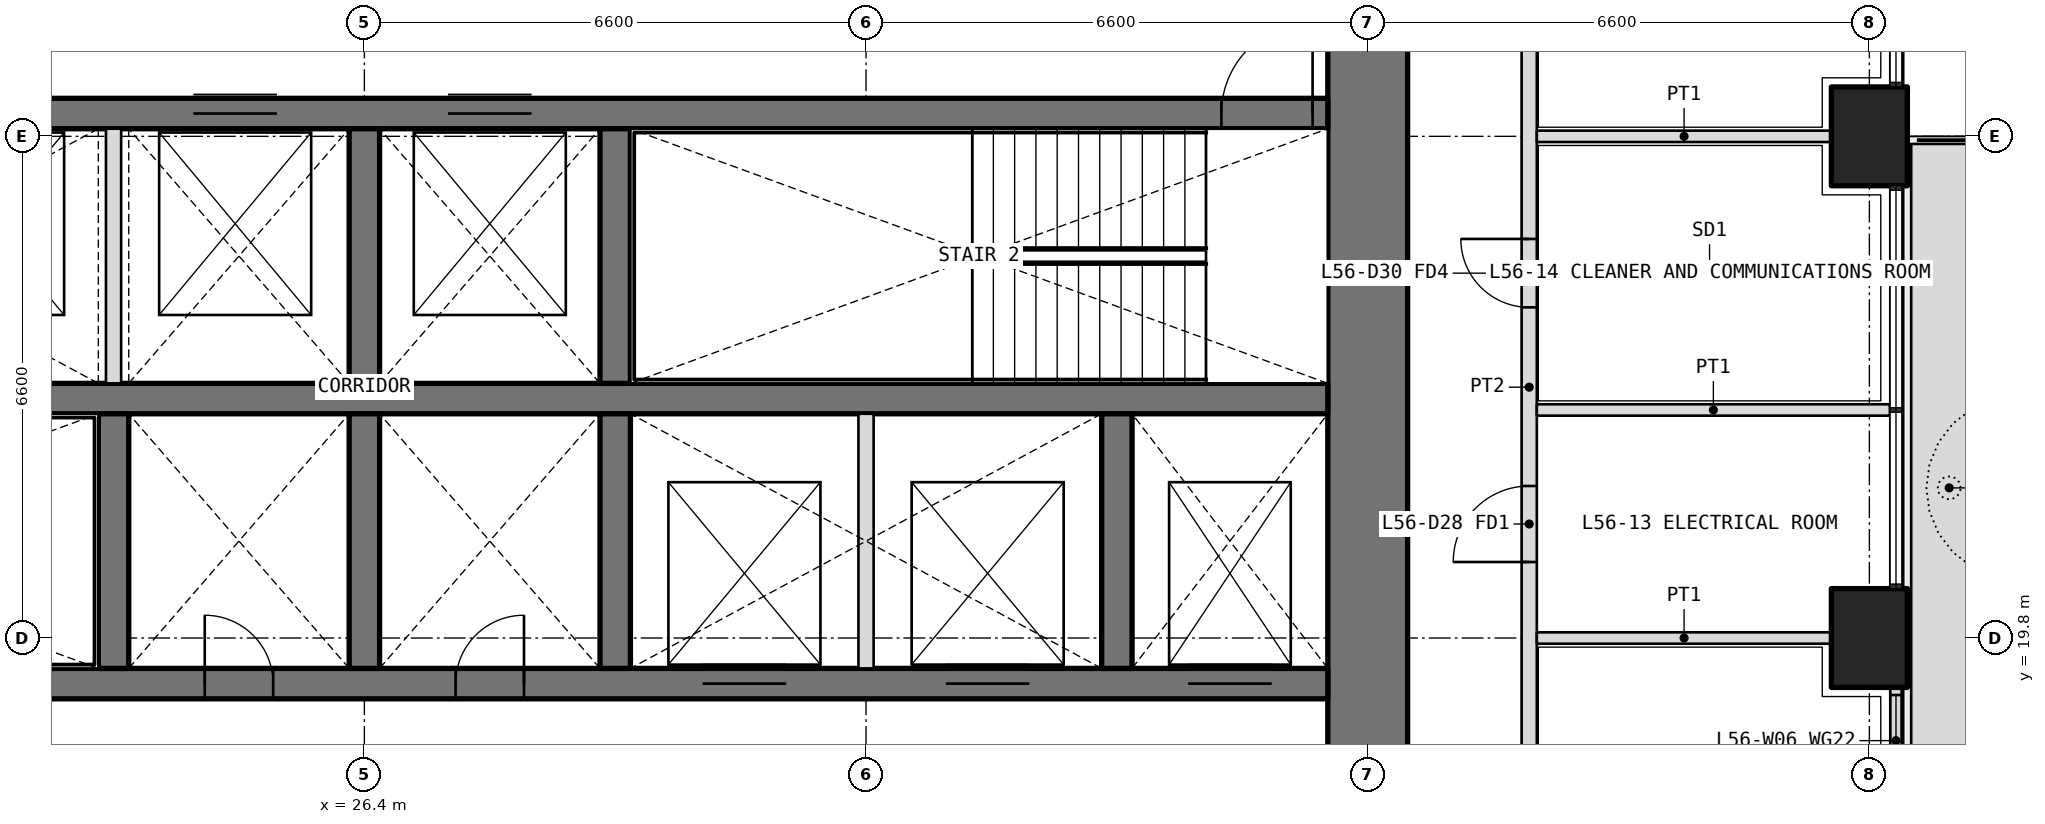
"""IFC4 building model, lengths in metres.
Left out: names, types, materials, properties, quantities, classifications, styles, units other than length and angle.
Written with IfcOpenShell. Run it as: python <this file> out.ifc"""

import sys

from ifc_helpers import new_model, si_unit, direction, frame, frame_2d, origin, origin_2d, place, context, subcontext, project, spatial, polyline, rectangle, outline, extrude, element, fill, save


model = new_model("IFC4")
c1 = context("Model", 3, precision=1e-05, world=origin(), true_north=direction((0.0, 1.0)))
c2 = subcontext(c1, "Body", "Model", "MODEL_VIEW")
j1 = project(units=[si_unit("LENGTHUNIT", "METRE"), si_unit("PLANEANGLEUNIT", "RADIAN")], contexts=[c1])
p1 = place(None, origin())
s1 = spatial("IfcSite", under=j1, at=p1, CompositionType="ELEMENT")
p2 = place(p1, origin())
s2 = spatial("IfcBuilding", under=s1, at=p2, CompositionType="ELEMENT")
p3 = place(p2, frame((0.0, 0.0, 246.0)))
s3 = spatial("IfcBuildingStorey", under=s2, at=p3, CompositionType="ELEMENT", Elevation=246.0)
for number, where, z_axis, x_axis in (
    (1, (46.2, 19.8, 0.0), (0.0, 0.0, 1.0), (0.0, 1.0, 0.0)),
    (2, (46.2, 26.4, 0.0), (0.0, 0.0, 1.0), (0.0, 1.0, 0.0)),
):
    element("IfcColumn", number, at=place(p3, frame(where, z_axis=z_axis, x_axis=x_axis)), inside=s3, PredefinedType="COLUMN", context=c2, shape_type="SweptSolid", body=[
        extrude(rectangle(XDim=1.3, YDim=1.0, at=origin_2d()), origin(), (0.0, 0.0, 1.0), 4.2),
    ])
p4 = place(p3, origin())
e3 = element("IfcWall", 3, at=p4, inside=s3, PredefinedType="USERDEFINED", context=c2, shape_type="SweptSolid", body=[
    extrude(outline(polyline([(46.75, 17.25), (47.75, 17.25), (47.75, 26.3), (46.75, 26.3), (46.75, 17.25)]), holes=[polyline([(46.9, 17.4), (47.6, 17.4), (47.6, 26.15), (46.9, 26.15), (46.9, 17.4)])]), origin(), (0.0, 0.0, 1.0), 1.05),
])
p5 = place(p3, frame((46.55, 13.85, 0.0), z_axis=(0.0, 0.0, 1.0), x_axis=(0.0, 1.0, 0.0)))
e4 = element("IfcWall", 4, at=p5, inside=s3, PredefinedType="SOLIDWALL", context=c2, shape_type="SweptSolid", body=[
    extrude(rectangle(XDim=5.3, YDim=0.15, at=frame_2d((2.65, 0.0))), origin(), (0.0, 0.0, 1.0), 2.7),
])
p6 = place(p5, frame((2.9, 0.0, 0.0)))
e5 = element("IfcOpeningElement", 5, at=p6, cuts=e4, PredefinedType="OPENING", context=c2, shape_type="SweptSolid", body=[
    extrude(rectangle(XDim=1.0, YDim=2.4, at=frame_2d((0.5, 1.2))), frame((0.0, 0.085, 0.0), z_axis=(0.0, -1.0, 0.0), x_axis=(1.0, 0.0, 0.0)), (0.0, 0.0, 1.0), 0.17),
])
p7 = place(p5, frame((0.1, 0.0, 0.1)))
e6 = element("IfcOpeningElement", 6, at=p7, cuts=e4, PredefinedType="OPENING", context=c2, shape_type="SweptSolid", body=[
    extrude(rectangle(XDim=2.3, YDim=2.3, at=frame_2d((1.15, 1.15))), frame((0.0, 0.085, 0.0), z_axis=(0.0, -1.0, 0.0), x_axis=(1.0, 0.0, 0.0)), (0.0, 0.0, 1.0), 0.17),
])
p8 = place(p5, frame((4.0, 0.0, 0.1)))
e7 = element("IfcOpeningElement", 7, at=p8, cuts=e4, PredefinedType="OPENING", context=c2, shape_type="SweptSolid", body=[
    extrude(rectangle(XDim=1.2, YDim=2.3, at=frame_2d((0.6, 1.15))), frame((0.0, 0.085, 0.0), z_axis=(0.0, -1.0, 0.0), x_axis=(1.0, 0.0, 0.0)), (0.0, 0.0, 1.0), 0.17),
])
p9 = place(p3, frame((39.6, 13.725, 0.0), z_axis=(0.0, 0.0, 1.0), x_axis=(0.0, 1.0, 0.0)))
e8 = element("IfcWall", 8, at=p9, inside=s3, PredefinedType="SHEAR", context=c2, shape_type="SweptSolid", body=[
    extrude(rectangle(XDim=18.75, YDim=1.05, at=frame_2d((9.375, 0.0))), origin(), (0.0, 0.0, 1.0), 4.2),
])
p10 = place(p9, frame((3.025, 0.0, 0.0)))
e9 = element("IfcOpeningElement", 9, at=p10, cuts=e8, PredefinedType="OPENING", context=c2, shape_type="SweptSolid", body=[
    extrude(rectangle(XDim=1.6, YDim=2.1, at=frame_2d((0.8, 1.05))), frame((0.0, 0.535, 0.0), z_axis=(0.0, -1.0, 0.0), x_axis=(1.0, 0.0, 0.0)), (0.0, 0.0, 1.0), 1.07),
])
p11 = place(p9, frame((13.825, 0.0, 0.0)))
e10 = element("IfcOpeningElement", 10, at=p11, cuts=e8, PredefinedType="OPENING", context=c2, shape_type="SweptSolid", body=[
    extrude(rectangle(XDim=1.6, YDim=2.1, at=frame_2d((0.8, 1.05))), frame((0.0, 0.535, 0.0), z_axis=(0.0, -1.0, 0.0), x_axis=(1.0, 0.0, 0.0)), (0.0, 0.0, 1.0), 1.07),
])
p12 = place(p3, frame((13.725, 19.2, 0.0), z_axis=(0.0, 0.0, 1.0), x_axis=(1.0, 0.0, 0.0)))
e11 = element("IfcWall", 11, at=p12, inside=s3, PredefinedType="SHEAR", context=c2, shape_type="SweptSolid", body=[
    extrude(rectangle(XDim=25.35, YDim=0.4, at=frame_2d((12.675, 0.0))), origin(), (0.0, 0.0, 1.0), 4.2),
])
p13 = place(p12, frame((10.575, 0.0, 0.0)))
e12 = element("IfcOpeningElement", 12, at=p13, cuts=e11, PredefinedType="OPENING", context=c2, shape_type="SweptSolid", body=[
    extrude(rectangle(XDim=0.9, YDim=2.1, at=frame_2d((0.45, 1.05))), frame((0.0, 0.21, 0.0), z_axis=(0.0, -1.0, 0.0), x_axis=(1.0, 0.0, 0.0)), (0.0, 0.0, 1.0), 0.42),
])
p14 = place(p12, frame((13.875, 0.0, 0.0)))
e13 = element("IfcOpeningElement", 13, at=p14, cuts=e11, PredefinedType="OPENING", context=c2, shape_type="SweptSolid", body=[
    extrude(rectangle(XDim=0.9, YDim=2.1, at=frame_2d((0.45, 1.05))), frame((0.0, 0.21, 0.0), z_axis=(0.0, -1.0, 0.0), x_axis=(1.0, 0.0, 0.0)), (0.0, 0.0, 1.0), 0.42),
])
p15 = place(p12, frame((0.2, 0.0, 0.0)))
e14 = element("IfcOpeningElement", 14, at=p15, cuts=e11, PredefinedType="OPENING", context=c2, shape_type="SweptSolid", body=[
    extrude(rectangle(XDim=1.2, YDim=2.1, at=frame_2d((0.6, 1.05))), frame((0.0, 0.21, 0.0), z_axis=(0.0, -1.0, 0.0), x_axis=(1.0, 0.0, 0.0)), (0.0, 0.0, 1.0), 0.42),
])
p16 = place(p12, frame((23.512, 0.0, 0.0)))
e15 = element("IfcOpeningElement", 15, at=p16, cuts=e11, PredefinedType="OPENING", context=c2, shape_type="SweptSolid", body=[
    extrude(rectangle(XDim=1.1, YDim=2.1, at=frame_2d((0.55, 1.05))), frame((0.0, 0.21, 0.0), z_axis=(0.0, -1.0, 0.0), x_axis=(1.0, 0.0, 0.0)), (0.0, 0.0, 1.0), 0.42),
])
p17 = place(p12, frame((17.125, 0.0, 0.0)))
e16 = element("IfcOpeningElement", 16, at=p17, cuts=e11, PredefinedType="OPENING", context=c2, shape_type="SweptSolid", body=[
    extrude(rectangle(XDim=1.1, YDim=2.1, at=frame_2d((0.55, 1.05))), frame((0.0, 0.21, 0.0), z_axis=(0.0, -1.0, 0.0), x_axis=(1.0, 0.0, 0.0)), (0.0, 0.0, 1.0), 0.42),
])
p18 = place(p12, frame((20.325, 0.0, 0.0)))
e17 = element("IfcOpeningElement", 17, at=p18, cuts=e11, PredefinedType="OPENING", context=c2, shape_type="SweptSolid", body=[
    extrude(rectangle(XDim=1.1, YDim=2.1, at=frame_2d((0.55, 1.05))), frame((0.0, 0.21, 0.0), z_axis=(0.0, -1.0, 0.0), x_axis=(1.0, 0.0, 0.0)), (0.0, 0.0, 1.0), 0.42),
])
p19 = place(p3, frame((13.725, 22.95, 0.0), z_axis=(0.0, 0.0, 1.0), x_axis=(1.0, 0.0, 0.0)))
e18 = element("IfcWall", 18, at=p19, inside=s3, PredefinedType="SHEAR", context=c2, shape_type="SweptSolid", body=[
    extrude(rectangle(XDim=25.35, YDim=0.4, at=frame_2d((12.675, 0.0))), origin(), (0.0, 0.0, 1.0), 4.2),
])
p20 = place(p3, frame((13.725, 26.7, 0.0), z_axis=(0.0, 0.0, 1.0), x_axis=(1.0, 0.0, 0.0)))
e19 = element("IfcWall", 19, at=p20, inside=s3, PredefinedType="SHEAR", context=c2, shape_type="SweptSolid", body=[
    extrude(rectangle(XDim=25.35, YDim=0.4, at=frame_2d((12.675, 0.0))), origin(), (0.0, 0.0, 1.0), 4.2),
])
p21 = place(p20, frame((23.95, 0.0, 0.0)))
e20 = element("IfcOpeningElement", 20, at=p21, cuts=e19, PredefinedType="OPENING", context=c2, shape_type="SweptSolid", body=[
    extrude(rectangle(XDim=1.2, YDim=2.1, at=frame_2d((0.6, 1.05))), frame((0.0, 0.21, 0.0), z_axis=(0.0, -1.0, 0.0), x_axis=(1.0, 0.0, 0.0)), (0.0, 0.0, 1.0), 0.42),
])
p22 = place(p20, frame((0.738, 0.0, 0.0)))
e21 = element("IfcOpeningElement", 21, at=p22, cuts=e19, PredefinedType="OPENING", context=c2, shape_type="SweptSolid", body=[
    extrude(rectangle(XDim=1.1, YDim=2.1, at=frame_2d((0.55, 1.05))), frame((0.0, 0.21, 0.0), z_axis=(0.0, -1.0, 0.0), x_axis=(1.0, 0.0, 0.0)), (0.0, 0.0, 1.0), 0.42),
])
p23 = place(p20, frame((3.925, 0.0, 0.0)))
e22 = element("IfcOpeningElement", 22, at=p23, cuts=e19, PredefinedType="OPENING", context=c2, shape_type="SweptSolid", body=[
    extrude(rectangle(XDim=1.1, YDim=2.1, at=frame_2d((0.55, 1.05))), frame((0.0, 0.21, 0.0), z_axis=(0.0, -1.0, 0.0), x_axis=(1.0, 0.0, 0.0)), (0.0, 0.0, 1.0), 0.42),
])
p24 = place(p20, frame((7.175, 0.0, 0.0)))
e23 = element("IfcOpeningElement", 23, at=p24, cuts=e19, PredefinedType="OPENING", context=c2, shape_type="SweptSolid", body=[
    extrude(rectangle(XDim=1.1, YDim=2.1, at=frame_2d((0.55, 1.05))), frame((0.0, 0.21, 0.0), z_axis=(0.0, -1.0, 0.0), x_axis=(1.0, 0.0, 0.0)), (0.0, 0.0, 1.0), 0.42),
])
p25 = place(p20, frame((10.425, 0.0, 0.0)))
e24 = element("IfcOpeningElement", 24, at=p25, cuts=e19, PredefinedType="OPENING", context=c2, shape_type="SweptSolid", body=[
    extrude(rectangle(XDim=1.1, YDim=2.1, at=frame_2d((0.55, 1.05))), frame((0.0, 0.21, 0.0), z_axis=(0.0, -1.0, 0.0), x_axis=(1.0, 0.0, 0.0)), (0.0, 0.0, 1.0), 0.42),
])
p26 = place(p20, frame((13.775, 0.0, 0.0)))
e25 = element("IfcOpeningElement", 25, at=p26, cuts=e19, PredefinedType="OPENING", context=c2, shape_type="SweptSolid", body=[
    extrude(rectangle(XDim=1.1, YDim=2.1, at=frame_2d((0.55, 1.05))), frame((0.0, 0.21, 0.0), z_axis=(0.0, -1.0, 0.0), x_axis=(1.0, 0.0, 0.0)), (0.0, 0.0, 1.0), 0.42),
])
for number, where, z_axis, x_axis in (
    (26, (23.1, 19.4, 0.0), (0.0, 0.0, 1.0), (0.0, 1.0, 0.0)),
    (27, (26.4, 19.4, 0.0), (0.0, 0.0, 1.0), (0.0, 1.0, 0.0)),
    (28, (29.7, 19.4, 0.0), (0.0, 0.0, 1.0), (0.0, 1.0, 0.0)),
    (29, (36.3, 19.4, 0.0), (0.0, 0.0, 1.0), (0.0, 1.0, 0.0)),
    (30, (26.4, 23.15, 0.0), (0.0, 0.0, 1.0), (0.0, 1.0, 0.0)),
    (31, (29.7, 23.15, 0.0), (0.0, 0.0, 1.0), (0.0, 1.0, 0.0)),
):
    element("IfcWall", number, at=place(p3, frame(where, z_axis=z_axis, x_axis=x_axis)), inside=s3, PredefinedType="SHEAR", context=c2, shape_type="SweptSolid", body=[
        extrude(rectangle(XDim=3.35, YDim=0.4, at=frame_2d((1.675, 0.0))), origin(), (0.0, 0.0, 1.0), 4.2),
    ])
for number, where, z_axis, x_axis in (
    (32, (33.0, 19.4, 0.0), (0.0, 0.0, 1.0), (0.0, 1.0, 0.0)),
    (33, (23.1, 23.15, 0.0), (0.0, 0.0, 1.0), (0.0, 1.0, 0.0)),
):
    element("IfcWall", number, at=place(p3, frame(where, z_axis=z_axis, x_axis=x_axis)), inside=s3, PredefinedType="PARTITIONING", context=c2, shape_type="SweptSolid", body=[
        extrude(rectangle(XDim=3.35, YDim=0.2, at=frame_2d((1.675, 0.0))), origin(), (0.0, 0.0, 1.0), 4.2),
    ])
p27 = place(p3, frame((41.725, 7.4, 0.0), z_axis=(0.0, 0.0, 1.0), x_axis=(0.0, 1.0, 0.0)))
e34 = element("IfcWall", 34, at=p27, inside=s3, PredefinedType="PARTITIONING", context=c2, shape_type="SweptSolid", body=[
    extrude(rectangle(XDim=31.4, YDim=0.2, at=frame_2d((15.7, 0.0))), origin(), (0.0, 0.0, 1.0), 3.0),
])
p28 = place(p27, frame((5.65, 0.0, 0.0)))
e35 = element("IfcOpeningElement", 35, at=p28, cuts=e34, PredefinedType="OPENING", context=c2, shape_type="SweptSolid", body=[
    extrude(rectangle(XDim=1.0, YDim=2.1, at=frame_2d((0.5, 1.05))), frame((0.0, 0.11, 0.0), z_axis=(0.0, -1.0, 0.0), x_axis=(1.0, 0.0, 0.0)), (0.0, 0.0, 1.0), 0.22),
])
p29 = place(p27, frame((13.4, 0.0, 0.0)))
e36 = element("IfcOpeningElement", 36, at=p29, cuts=e34, PredefinedType="OPENING", context=c2, shape_type="SweptSolid", body=[
    extrude(rectangle(XDim=1.0, YDim=2.1, at=frame_2d((0.5, 1.05))), frame((0.0, 0.11, 0.0), z_axis=(0.0, -1.0, 0.0), x_axis=(1.0, 0.0, 0.0)), (0.0, 0.0, 1.0), 0.22),
])
p30 = place(p27, frame((16.75, 0.0, 0.0)))
e37 = element("IfcOpeningElement", 37, at=p30, cuts=e34, PredefinedType="OPENING", context=c2, shape_type="SweptSolid", body=[
    extrude(rectangle(XDim=0.9, YDim=2.1, at=frame_2d((0.45, 1.05))), frame((0.0, 0.11, 0.0), z_axis=(0.0, -1.0, 0.0), x_axis=(1.0, 0.0, 0.0)), (0.0, 0.0, 1.0), 0.22),
])
p31 = place(p27, frame((21.8, 0.0, 0.0)))
e38 = element("IfcOpeningElement", 38, at=p31, cuts=e34, PredefinedType="OPENING", context=c2, shape_type="SweptSolid", body=[
    extrude(rectangle(XDim=1.0, YDim=2.1, at=frame_2d((0.5, 1.05))), frame((0.0, 0.11, 0.0), z_axis=(0.0, -1.0, 0.0), x_axis=(1.0, 0.0, 0.0)), (0.0, 0.0, 1.0), 0.22),
])
p32 = place(p27, frame((28.05, 0.0, 0.0)))
e39 = element("IfcOpeningElement", 39, at=p32, cuts=e34, PredefinedType="OPENING", context=c2, shape_type="SweptSolid", body=[
    extrude(rectangle(XDim=1.0, YDim=2.1, at=frame_2d((0.5, 1.05))), frame((0.0, 0.11, 0.0), z_axis=(0.0, -1.0, 0.0), x_axis=(1.0, 0.0, 0.0)), (0.0, 0.0, 1.0), 0.22),
])
p33 = place(p3, frame((46.47, 22.8, 0.0), z_axis=(0.0, 0.0, 1.0), x_axis=(-1.0, 0.0, 0.0)))
e40 = element("IfcWall", 40, at=p33, inside=s3, PredefinedType="PARTITIONING", context=c2, shape_type="SweptSolid", body=[
    extrude(rectangle(XDim=4.645, YDim=0.15, at=frame_2d((2.323, 0.0))), origin(), (0.0, 0.0, 1.0), 2.7),
])
for number, where, z_axis, x_axis in (
    (41, (45.7, 26.4, 0.0), (0.0, 0.0, 1.0), (-1.0, 0.0, 0.0)),
    (42, (45.7, 19.8, 0.0), (0.0, 0.0, 1.0), (-1.0, 0.0, 0.0)),
):
    element("IfcWall", number, at=place(p3, frame(where, z_axis=z_axis, x_axis=x_axis)), inside=s3, PredefinedType="PARTITIONING", context=c2, shape_type="SweptSolid", body=[
        extrude(rectangle(XDim=3.875, YDim=0.15, at=frame_2d((1.938, 0.0))), origin(), (0.0, 0.0, 1.0), 3.0),
    ])
p34 = place(p8, origin())
e43 = element("IfcWindow", 43, at=p34, inside=s3, PartitioningType="SINGLE_PANEL", PredefinedType="WINDOW", context=c2, shape_type="SweptSolid", body=[
    extrude(rectangle(XDim=1.2, YDim=2.3, at=frame_2d((0.6, 1.15))), frame((0.0, 0.03, 0.0), z_axis=(0.0, -1.0, 0.0), x_axis=(1.0, 0.0, 0.0)), (0.0, 0.0, 1.0), 0.06),
])
fill(e7, e43)
p35 = place(p29, origin())
e44 = element("IfcDoor", 44, at=p35, inside=s3, OperationType="SINGLE_SWING_LEFT", PredefinedType="DOOR", context=c2, shape_type="SweptSolid", body=[
    extrude(rectangle(XDim=1.0, YDim=2.1, at=frame_2d((0.5, 1.05))), frame((0.0, 0.025, 0.0), z_axis=(0.0, -1.0, 0.0), x_axis=(1.0, 0.0, 0.0)), (0.0, 0.0, 1.0), 0.05),
])
fill(e36, e44)
p36 = place(p30, origin())
e45 = element("IfcDoor", 45, at=p36, inside=s3, OperationType="SINGLE_SWING_RIGHT", PredefinedType="DOOR", context=c2, shape_type="SweptSolid", body=[
    extrude(rectangle(XDim=0.9, YDim=2.1, at=frame_2d((0.45, 1.05))), frame((0.0, 0.025, 0.0), z_axis=(0.0, -1.0, 0.0), x_axis=(1.0, 0.0, 0.0)), (0.0, 0.0, 1.0), 0.05),
])
fill(e37, e45)
p37 = place(p13, origin())
e46 = element("IfcDoor", 46, at=p37, inside=s3, OperationType="SINGLE_SWING_LEFT", PredefinedType="DOOR", context=c2, shape_type="SweptSolid", body=[
    extrude(rectangle(XDim=0.9, YDim=2.1, at=frame_2d((0.45, 1.05))), frame((0.0, 0.025, 0.0), z_axis=(0.0, -1.0, 0.0), x_axis=(1.0, 0.0, 0.0)), (0.0, 0.0, 1.0), 0.05),
])
fill(e12, e46)
p38 = place(p14, origin())
e47 = element("IfcDoor", 47, at=p38, inside=s3, OperationType="SINGLE_SWING_RIGHT", PredefinedType="DOOR", context=c2, shape_type="SweptSolid", body=[
    extrude(rectangle(XDim=0.9, YDim=2.1, at=frame_2d((0.45, 1.05))), frame((0.0, 0.025, 0.0), z_axis=(0.0, -1.0, 0.0), x_axis=(1.0, 0.0, 0.0)), (0.0, 0.0, 1.0), 0.05),
])
fill(e13, e47)
p39 = place(p21, origin())
e48 = element("IfcDoor", 48, at=p39, inside=s3, OperationType="SINGLE_SWING_RIGHT", PredefinedType="DOOR", context=c2, shape_type="SweptSolid", body=[
    extrude(rectangle(XDim=1.2, YDim=2.1, at=frame_2d((0.6, 1.05))), frame((0.0, 0.025, 0.0), z_axis=(0.0, -1.0, 0.0), x_axis=(1.0, 0.0, 0.0)), (0.0, 0.0, 1.0), 0.05),
])
fill(e20, e48)
p40 = place(p16, origin())
e49 = element("IfcDoor", 49, at=p40, inside=s3, OperationType="DOUBLE_DOOR_SLIDING", PredefinedType="DOOR", context=c2, shape_type="SweptSolid", body=[
    extrude(rectangle(XDim=1.1, YDim=2.1, at=frame_2d((0.55, 1.05))), frame((0.0, 0.025, 0.0), z_axis=(0.0, -1.0, 0.0), x_axis=(1.0, 0.0, 0.0)), (0.0, 0.0, 1.0), 0.05),
])
fill(e15, e49)
p41 = place(p17, origin())
e50 = element("IfcDoor", 50, at=p41, inside=s3, OperationType="DOUBLE_DOOR_SLIDING", PredefinedType="DOOR", context=c2, shape_type="SweptSolid", body=[
    extrude(rectangle(XDim=1.1, YDim=2.1, at=frame_2d((0.55, 1.05))), frame((0.0, 0.025, 0.0), z_axis=(0.0, -1.0, 0.0), x_axis=(1.0, 0.0, 0.0)), (0.0, 0.0, 1.0), 0.05),
])
fill(e16, e50)
p42 = place(p18, origin())
e51 = element("IfcDoor", 51, at=p42, inside=s3, OperationType="DOUBLE_DOOR_SLIDING", PredefinedType="DOOR", context=c2, shape_type="SweptSolid", body=[
    extrude(rectangle(XDim=1.1, YDim=2.1, at=frame_2d((0.55, 1.05))), frame((0.0, 0.025, 0.0), z_axis=(0.0, -1.0, 0.0), x_axis=(1.0, 0.0, 0.0)), (0.0, 0.0, 1.0), 0.05),
])
fill(e17, e51)
p43 = place(p25, origin())
e52 = element("IfcDoor", 52, at=p43, inside=s3, OperationType="DOUBLE_DOOR_SLIDING", PredefinedType="DOOR", context=c2, shape_type="SweptSolid", body=[
    extrude(rectangle(XDim=1.1, YDim=2.1, at=frame_2d((0.55, 1.05))), frame((0.0, 0.025, 0.0), z_axis=(0.0, -1.0, 0.0), x_axis=(1.0, 0.0, 0.0)), (0.0, 0.0, 1.0), 0.05),
])
fill(e24, e52)
p44 = place(p26, origin())
e53 = element("IfcDoor", 53, at=p44, inside=s3, OperationType="DOUBLE_DOOR_SLIDING", PredefinedType="DOOR", context=c2, shape_type="SweptSolid", body=[
    extrude(rectangle(XDim=1.1, YDim=2.1, at=frame_2d((0.55, 1.05))), frame((0.0, 0.025, 0.0), z_axis=(0.0, -1.0, 0.0), x_axis=(1.0, 0.0, 0.0)), (0.0, 0.0, 1.0), 0.05),
])
fill(e25, e53)
save(model, sys.argv[1])
